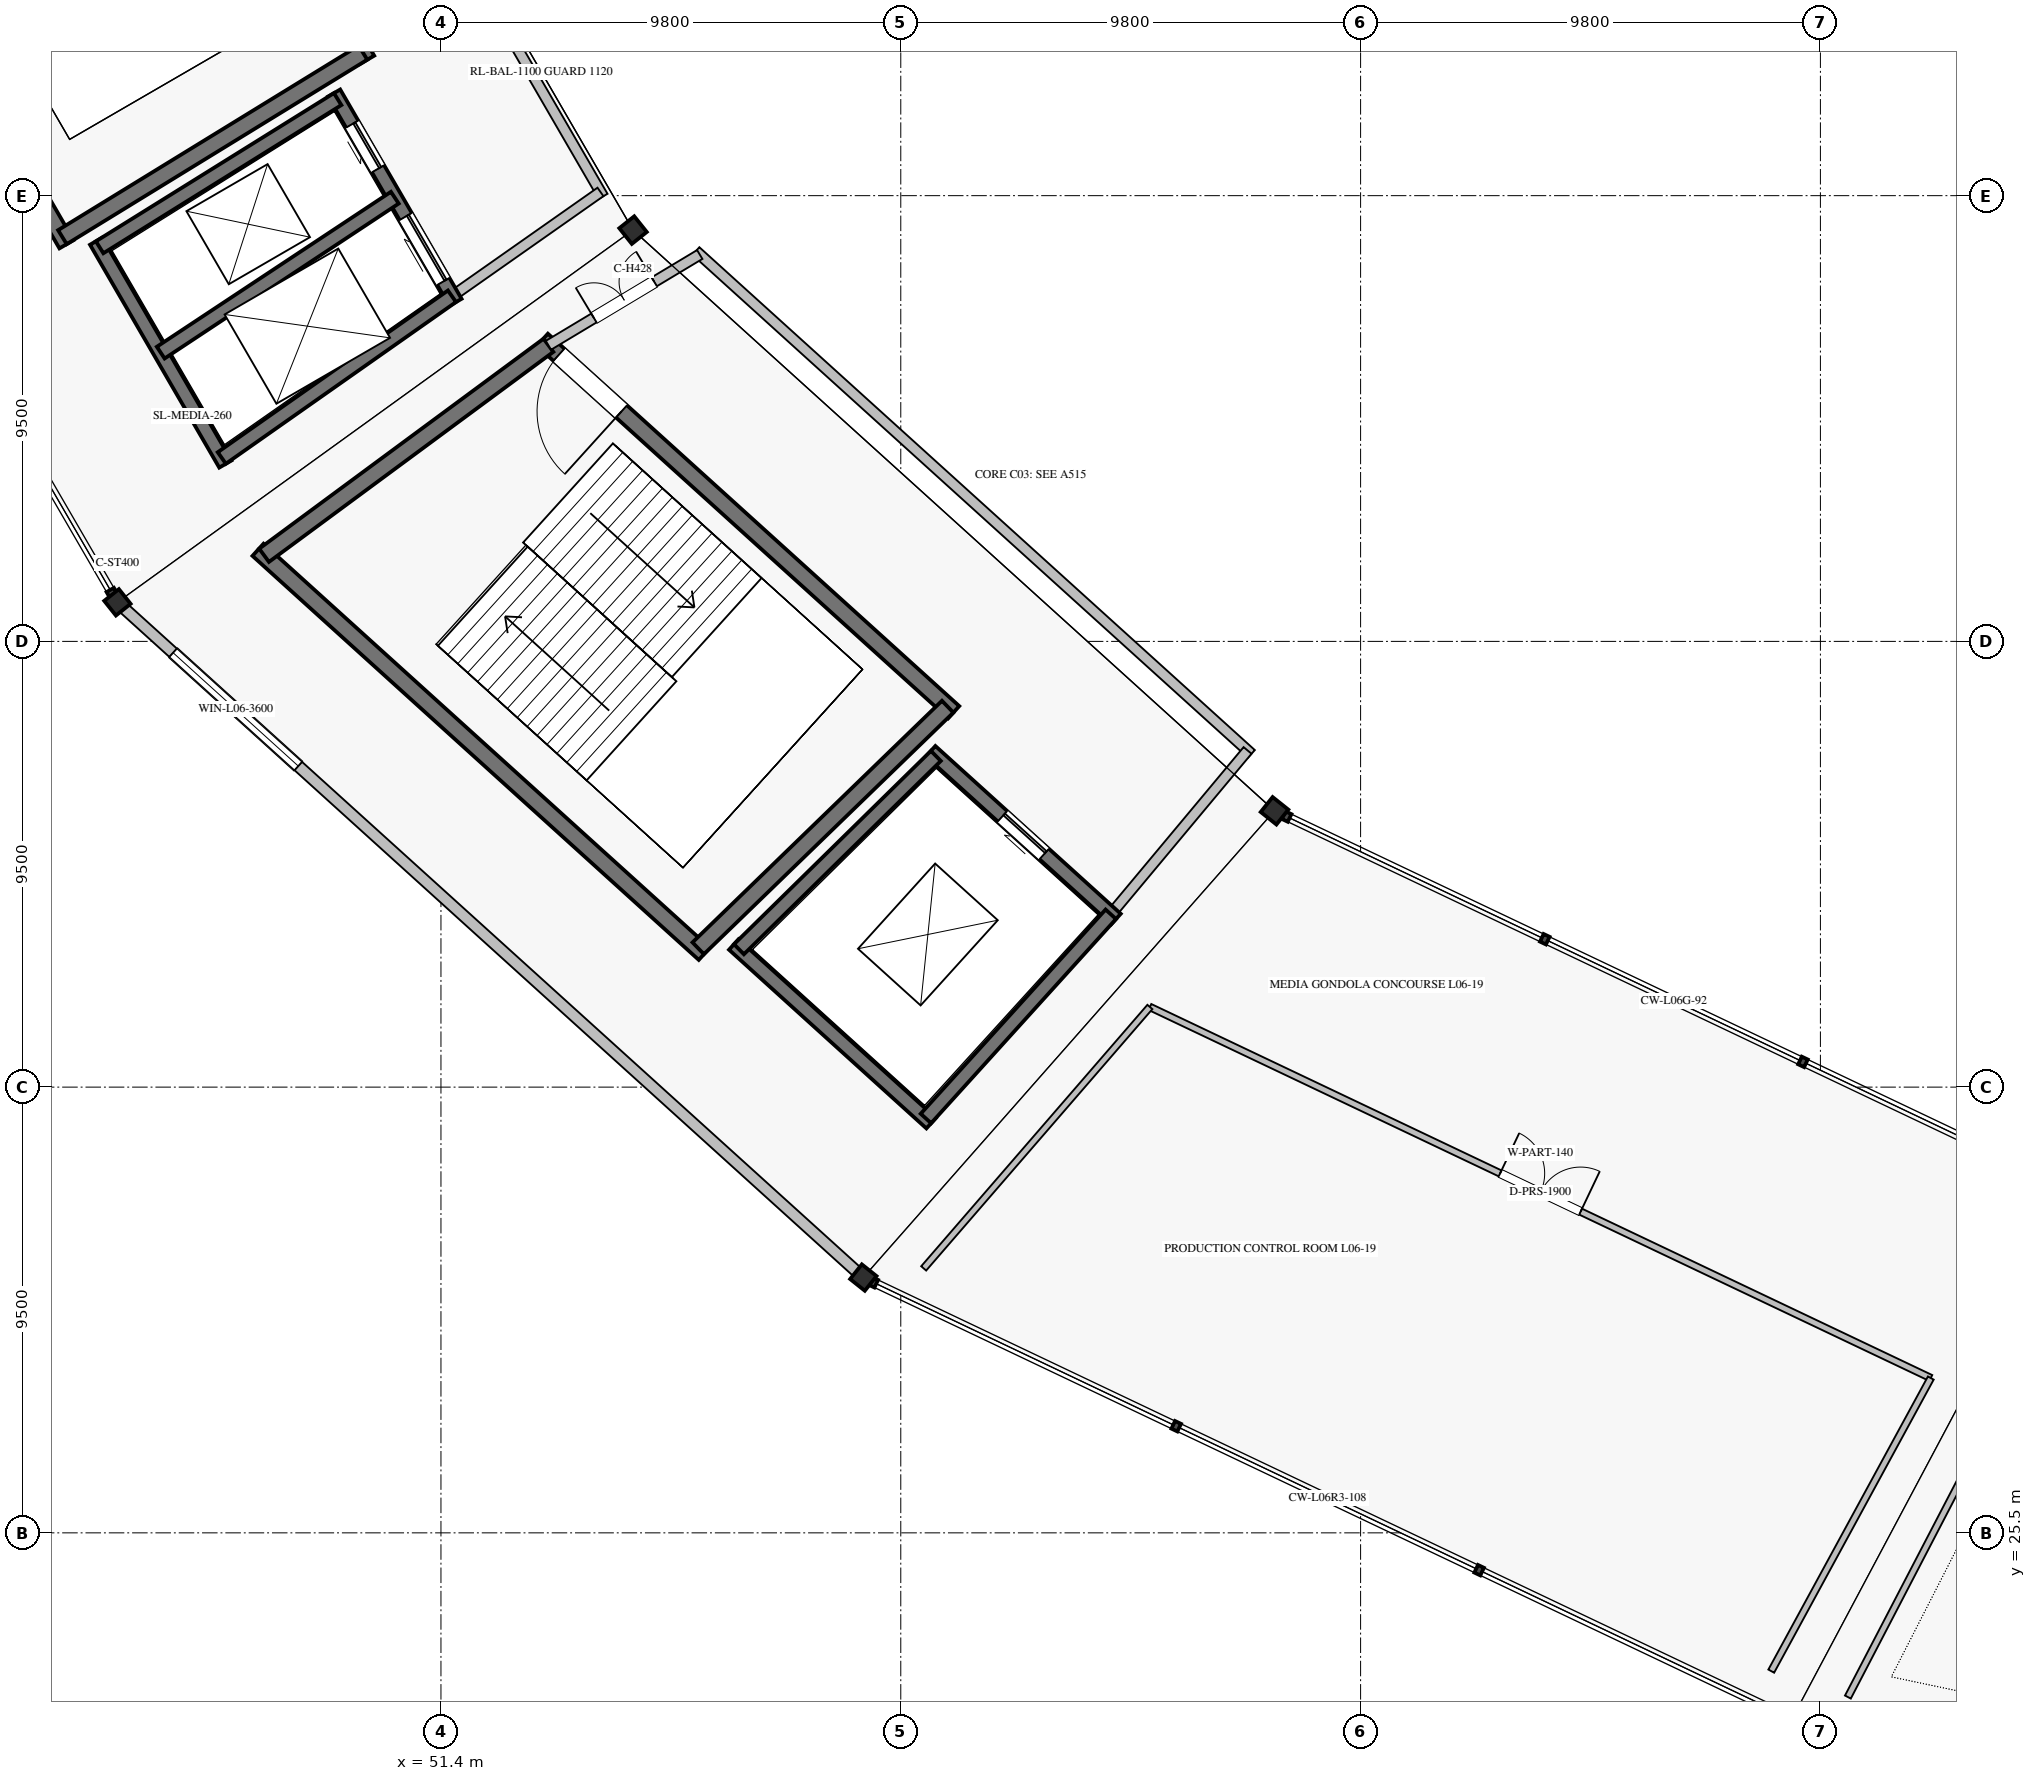
"""IFC4 building model, lengths in metres.
Left out: names, types, materials, properties, quantities, classifications, styles, units other than length and angle.
Written with IfcOpenShell. Run it as: python <this file> out.ifc"""

import sys

from ifc_helpers import new_model, si_unit, direction, frame, frame_2d, origin, origin_2d, place, context, subcontext, project, spatial, rectangle, hollow_rectangle, i_section, extrude, element, fill, save


model = new_model("IFC4")
c1 = context("Model", 3, precision=1e-05, world=origin(), true_north=direction((0.0, 1.0)))
c2 = subcontext(c1, "Body", "Model", "MODEL_VIEW")
j1 = project(units=[si_unit("LENGTHUNIT", "METRE"), si_unit("PLANEANGLEUNIT", "RADIAN")], contexts=[c1])
p1 = place(None, origin())
s1 = spatial("IfcSite", under=j1, at=p1, CompositionType="ELEMENT")
p2 = place(p1, origin())
s2 = spatial("IfcBuilding", under=s1, at=p2, CompositionType="ELEMENT")
p3 = place(p2, frame((0.0, 0.0, 31.28)))
s3 = spatial("IfcBuildingStorey", under=s2, at=p3, CompositionType="ELEMENT", Elevation=31.28)
for number, where, z_axis, x_axis in (
    (1, (55.494, 53.266, 0.0), (0.0, 0.0, 1.0), (-0.782, -0.623, 0.0)),
    (2, (69.166, 40.889, 0.0), (0.0, 0.0, 1.0), (-0.623, -0.782, 0.0)),
):
    element("IfcColumn", number, at=place(p3, frame(where, z_axis=z_axis, x_axis=x_axis)), inside=s3, PredefinedType="COLUMN", context=c2, shape_type="SweptSolid", body=[
        extrude(i_section(OverallWidth=0.407, OverallDepth=0.428, WebThickness=0.02, FlangeThickness=0.035, FilletRadius=0.013, at=origin_2d()), origin(), (0.0, 0.0, 1.0), 5.44),
    ])
for number, where, z_axis, x_axis in (
    (3, (44.505, 45.332, 0.0), (0.0, 0.0, 1.0), (-0.782, -0.623, 0.0)),
    (4, (60.402, 30.941, 0.0), (0.0, 0.0, 1.0), (-0.623, -0.782, 0.0)),
):
    element("IfcColumn", number, at=place(p3, frame(where, z_axis=z_axis, x_axis=x_axis)), inside=s3, PredefinedType="COLUMN", context=c2, shape_type="SweptSolid", body=[
        extrude(hollow_rectangle(XDim=0.4, YDim=0.4, WallThickness=0.019, at=origin_2d()), origin(), (0.0, 0.0, 1.0), 5.44),
    ])
p4 = place(p3, frame((44.653, 45.198, 0.0), z_axis=(0.0, 0.0, 1.0), x_axis=(0.74134637924, -0.671122601309, 0.0)))
e5 = element("IfcWall", 5, at=p4, inside=s3, PredefinedType="SOLIDWALL", context=c2, shape_type="SweptSolid", body=[
    extrude(rectangle(XDim=21.044, YDim=0.24, at=frame_2d((10.522, 0.0))), origin(), (0.0, 0.0, 1.0), 4.358),
])
p5 = place(p4, frame((1.4, 0.0, 1.0)))
e6 = element("IfcOpeningElement", 6, at=p5, cuts=e5, PredefinedType="OPENING", context=c2, shape_type="SweptSolid", body=[
    extrude(rectangle(XDim=3.6, YDim=2.4, at=frame_2d((1.8, 1.2))), frame((0.0, 0.13, 0.0), z_axis=(0.0, -1.0, 0.0), x_axis=(1.0, 0.0, 0.0)), (0.0, 0.0, 1.0), 0.26),
])
p6 = place(p3, frame((44.09, 66.788, 0.0), z_axis=(0.0, 0.0, 1.0), x_axis=(0.501628624814, -0.865083072755, 0.0)))
e7 = element("IfcWall", 7, at=p6, inside=s3, PredefinedType="SHEAR", context=c2, shape_type="SweptSolid", body=[
    extrude(rectangle(XDim=11.435, YDim=0.35, at=frame_2d((5.718, 0.0))), origin(), (0.0, 0.0, 1.0), 5.16),
])
p7 = place(p6, frame((0.475, 0.0, 0.0)))
e8 = element("IfcOpeningElement", 8, at=p7, cuts=e7, PredefinedType="OPENING", context=c2, shape_type="SweptSolid", body=[
    extrude(rectangle(XDim=1.8, YDim=2.2, at=frame_2d((0.9, 1.1))), frame((0.0, 0.185, 0.0), z_axis=(0.0, -1.0, 0.0), x_axis=(1.0, 0.0, 0.0)), (0.0, 0.0, 1.0), 0.37),
])
p8 = place(p3, frame((37.198, 63.695, 0.0), z_axis=(0.0, 0.0, 1.0), x_axis=(0.501601740165, -0.865098661577, 0.0)))
e9 = element("IfcWall", 9, at=p8, inside=s3, PredefinedType="SHEAR", context=c2, shape_type="SweptSolid", body=[
    extrude(rectangle(XDim=12.405, YDim=0.35, at=frame_2d((6.202, 0.0))), origin(), (0.0, 0.0, 1.0), 5.16),
])
p9 = place(p3, frame((49.739, 57.046, 0.0), z_axis=(0.0, 0.0, 1.0), x_axis=(-0.852334575619, -0.522996913188, 0.0)))
e10 = element("IfcWall", 10, at=p9, inside=s3, PredefinedType="SHEAR", context=c2, shape_type="SweptSolid", body=[
    extrude(rectangle(XDim=7.516, YDim=0.35, at=frame_2d((3.758, 0.0))), origin(), (0.0, 0.0, 1.0), 5.16),
])
p10 = place(p3, frame((49.123, 56.188, 0.0), z_axis=(0.0, 0.0, 1.0), x_axis=(0.501629534056, -0.86508254552, 0.0)))
e11 = element("IfcWall", 11, at=p10, inside=s3, PredefinedType="SHEAR", context=c2, shape_type="SweptSolid", body=[
    extrude(rectangle(XDim=5.157, YDim=0.3, at=frame_2d((2.579, 0.0))), origin(), (0.0, 0.0, 1.0), 5.16),
])
p11 = place(p10, frame((0.766, 0.0, 0.0)))
e12 = element("IfcOpeningElement", 12, at=p11, cuts=e11, PredefinedType="OPENING", context=c2, shape_type="SweptSolid", body=[
    extrude(rectangle(XDim=1.1, YDim=2.2, at=frame_2d((0.55, 1.1))), frame((0.0, 0.16, 0.0), z_axis=(0.0, -1.0, 0.0), x_axis=(1.0, 0.0, 0.0)), (0.0, 0.0, 1.0), 0.32),
])
p12 = place(p10, frame((3.042, 0.0, 0.0)))
e13 = element("IfcOpeningElement", 13, at=p12, cuts=e11, PredefinedType="OPENING", context=c2, shape_type="SweptSolid", body=[
    extrude(rectangle(XDim=1.6, YDim=2.3, at=frame_2d((0.8, 1.15))), frame((0.0, 0.16, 0.0), z_axis=(0.0, -1.0, 0.0), x_axis=(1.0, 0.0, 0.0)), (0.0, 0.0, 1.0), 0.32),
])
p13 = place(p3, frame((44.05, 53.03, 0.0), z_axis=(0.0, 0.0, 1.0), x_axis=(0.501596987756, -0.865101417103, 0.0)))
e14 = element("IfcWall", 14, at=p13, inside=s3, PredefinedType="SHEAR", context=c2, shape_type="SweptSolid", body=[
    extrude(rectangle(XDim=5.491, YDim=0.3, at=frame_2d((2.746, 0.0))), origin(), (0.0, 0.0, 1.0), 5.16),
])
p14 = place(p3, frame((49.198, 56.058, 0.0), z_axis=(0.0, 0.0, 1.0), x_axis=(-0.848938067893, -0.528492343257, 0.0)))
e15 = element("IfcWall", 15, at=p14, inside=s3, PredefinedType="SHEAR", context=c2, shape_type="SweptSolid", body=[
    extrude(rectangle(XDim=5.975, YDim=0.3, at=frame_2d((2.988, 0.0))), origin(), (0.0, 0.0, 1.0), 5.16),
])
p15 = place(p3, frame((51.635, 51.855, 0.0), z_axis=(0.0, 0.0, 1.0), x_axis=(-0.818205158105, -0.574926359851, 0.0)))
e16 = element("IfcWall", 16, at=p15, inside=s3, PredefinedType="SHEAR", context=c2, shape_type="SweptSolid", body=[
    extrude(rectangle(XDim=5.995, YDim=0.3, at=frame_2d((2.998, 0.0))), origin(), (0.0, 0.0, 1.0), 5.16),
])
p16 = place(p3, frame((50.417, 53.957, 0.0), z_axis=(0.0, 0.0, 1.0), x_axis=(-0.833878900042, -0.551947443209, 0.0)))
e17 = element("IfcWall", 17, at=p16, inside=s3, PredefinedType="SHEAR", context=c2, shape_type="SweptSolid", body=[
    extrude(rectangle(XDim=5.983, YDim=0.3, at=frame_2d((2.991, 0.0))), origin(), (0.0, 0.0, 1.0), 5.16),
])
p17 = place(p3, frame((46.774, 67.921, 0.0), z_axis=(0.0, 0.0, 1.0), x_axis=(0.501612626242, -0.865092349518, 0.0)))
e18 = element("IfcWall", 18, at=p17, inside=s3, PredefinedType="SOLIDWALL", context=c2, shape_type="SweptSolid", body=[
    extrude(rectangle(XDim=16.11, YDim=0.22, at=frame_2d((8.055, 0.0))), origin(), (0.0, 0.0, 1.0), 5.16),
])
p18 = place(p3, frame((54.8, 54.079, 0.0), z_axis=(0.0, 0.0, 1.0), x_axis=(-0.818225400643, -0.574897550649, 0.0)))
e19 = element("IfcWall", 19, at=p18, inside=s3, PredefinedType="SOLIDWALL", context=c2, shape_type="SweptSolid", body=[
    extrude(rectangle(XDim=3.868, YDim=0.22, at=frame_2d((1.934, 0.0))), origin(), (0.0, 0.0, 1.0), 5.16),
])
p19 = place(p3, frame((53.561, 50.928, 0.0), z_axis=(0.0, 0.0, 1.0), x_axis=(0.741358227035, -0.671109513572, 0.0)))
e20 = element("IfcWall", 20, at=p19, inside=s3, PredefinedType="SHEAR", context=c2, shape_type="SweptSolid", body=[
    extrude(rectangle(XDim=11.827, YDim=0.35, at=frame_2d((5.913, 0.0))), origin(), (0.0, 0.0, 1.0), 5.16),
])
p20 = place(p19, frame((0.475, 0.0, 0.0)))
e21 = element("IfcOpeningElement", 21, at=p20, cuts=e20, PredefinedType="OPENING", context=c2, shape_type="SweptSolid", body=[
    extrude(rectangle(XDim=1.8, YDim=2.2, at=frame_2d((0.9, 1.1))), frame((0.0, 0.185, 0.0), z_axis=(0.0, -1.0, 0.0), x_axis=(1.0, 0.0, 0.0)), (0.0, 0.0, 1.0), 0.37),
])
p21 = place(p3, frame((47.501, 46.452, 0.0), z_axis=(0.0, 0.0, 1.0), x_axis=(0.741351373721, -0.671117084183, 0.0)))
e22 = element("IfcWall", 22, at=p21, inside=s3, PredefinedType="SHEAR", context=c2, shape_type="SweptSolid", body=[
    extrude(rectangle(XDim=12.83, YDim=0.35, at=frame_2d((6.415, 0.0))), origin(), (0.0, 0.0, 1.0), 5.16),
])
p22 = place(p3, frame((53.691, 50.811, 0.0), z_axis=(0.0, 0.0, 1.0), x_axis=(-0.804395625347, -0.594093997548, 0.0)))
e23 = element("IfcWall", 23, at=p22, inside=s3, PredefinedType="SHEAR", context=c2, shape_type="SweptSolid", body=[
    extrude(rectangle(XDim=7.534, YDim=0.35, at=frame_2d((3.767, 0.0))), origin(), (0.0, 0.0, 1.0), 5.16),
])
p23 = place(p3, frame((62.199, 43.108, 0.0), z_axis=(0.0, 0.0, 1.0), x_axis=(-0.718297398554, -0.69573619083, 0.0)))
e24 = element("IfcWall", 24, at=p23, inside=s3, PredefinedType="SHEAR", context=c2, shape_type="SweptSolid", body=[
    extrude(rectangle(XDim=7.402, YDim=0.35, at=frame_2d((3.701, 0.0))), origin(), (0.0, 0.0, 1.0), 5.16),
])
p24 = place(p3, frame((61.837, 42.159, 0.0), z_axis=(0.0, 0.0, 1.0), x_axis=(0.741350155641, -0.671118429736, 0.0)))
e25 = element("IfcWall", 25, at=p24, inside=s3, PredefinedType="SHEAR", context=c2, shape_type="SweptSolid", body=[
    extrude(rectangle(XDim=5.329, YDim=0.3, at=frame_2d((2.665, 0.0))), origin(), (0.0, 0.0, 1.0), 5.16),
])
p25 = place(p24, frame((2.065, 0.0, 0.0)))
e26 = element("IfcOpeningElement", 26, at=p25, cuts=e25, PredefinedType="OPENING", context=c2, shape_type="SweptSolid", body=[
    extrude(rectangle(XDim=1.2, YDim=2.2, at=frame_2d((0.6, 1.1))), frame((0.0, 0.16, 0.0), z_axis=(0.0, -1.0, 0.0), x_axis=(1.0, 0.0, 0.0)), (0.0, 0.0, 1.0), 0.32),
])
p26 = place(p3, frame((57.64, 38.039, 0.0), z_axis=(0.0, 0.0, 1.0), x_axis=(0.74134208775, -0.671127341815, 0.0)))
e27 = element("IfcWall", 27, at=p26, inside=s3, PredefinedType="SHEAR", context=c2, shape_type="SweptSolid", body=[
    extrude(rectangle(XDim=5.675, YDim=0.3, at=frame_2d((2.837, 0.0))), origin(), (0.0, 0.0, 1.0), 5.16),
])
p27 = place(p3, frame((61.948, 42.059, 0.0), z_axis=(0.0, 0.0, 1.0), x_axis=(-0.713553028001, -0.700601224828, 0.0)))
e28 = element("IfcWall", 28, at=p27, inside=s3, PredefinedType="SHEAR", context=c2, shape_type="SweptSolid", body=[
    extrude(rectangle(XDim=5.881, YDim=0.3, at=frame_2d((2.94, 0.0))), origin(), (0.0, 0.0, 1.0), 5.16),
])
p28 = place(p3, frame((65.676, 38.684, 0.0), z_axis=(0.0, 0.0, 1.0), x_axis=(-0.67115829282, -0.741314067031, 0.0)))
e29 = element("IfcWall", 29, at=p28, inside=s3, PredefinedType="SHEAR", context=c2, shape_type="SweptSolid", body=[
    extrude(rectangle(XDim=5.871, YDim=0.3, at=frame_2d((2.935, 0.0))), origin(), (0.0, 0.0, 1.0), 5.16),
])
p29 = place(p3, frame((56.834, 52.819, 0.0), z_axis=(0.0, 0.0, 1.0), x_axis=(0.741351035574, -0.671117457717, 0.0)))
e30 = element("IfcWall", 30, at=p29, inside=s3, PredefinedType="SOLIDWALL", context=c2, shape_type="SweptSolid", body=[
    extrude(rectangle(XDim=15.969, YDim=0.22, at=frame_2d((7.985, 0.0))), origin(), (0.0, 0.0, 1.0), 5.16),
])
p30 = place(p3, frame((56.915, 52.746, 0.0), z_axis=(0.0, 0.0, 1.0), x_axis=(-0.857424171966, -0.514610327654, 0.0)))
e31 = element("IfcWall", 31, at=p30, inside=s3, PredefinedType="SOLIDWALL", context=c2, shape_type="SweptSolid", body=[
    extrude(rectangle(XDim=3.76, YDim=0.22, at=frame_2d((1.88, 0.0))), origin(), (0.0, 0.0, 1.0), 5.16),
])
p31 = place(p30, frame((1.13, 0.0, 0.0)))
e32 = element("IfcOpeningElement", 32, at=p31, cuts=e31, PredefinedType="OPENING", context=c2, shape_type="SweptSolid", body=[
    extrude(rectangle(XDim=1.5, YDim=2.2, at=frame_2d((0.75, 1.1))), frame((0.0, 0.12, 0.0), z_axis=(0.0, -1.0, 0.0), x_axis=(1.0, 0.0, 0.0)), (0.0, 0.0, 1.0), 0.24),
])
p32 = place(p3, frame((68.591, 42.176, 0.0), z_axis=(0.0, 0.0, 1.0), x_axis=(-0.640759627034, -0.767741558315, 0.0)))
e33 = element("IfcWall", 33, at=p32, inside=s3, PredefinedType="SOLIDWALL", context=c2, shape_type="SweptSolid", body=[
    extrude(rectangle(XDim=4.549, YDim=0.22, at=frame_2d((2.274, 0.0))), origin(), (0.0, 0.0, 1.0), 5.16),
])
p33 = place(p3, frame((66.509, 36.708, 0.0), z_axis=(0.0, 0.0, 1.0), x_axis=(0.90321677741, -0.429184637429, 0.0)))
e34 = element("IfcWall", 34, at=p33, inside=s3, PredefinedType="PARTITIONING", context=c2, shape_type="SweptSolid", body=[
    extrude(rectangle(XDim=18.427, YDim=0.14, at=frame_2d((9.214, 0.0))), origin(), (0.0, 0.0, 1.0), 4.48),
])
p34 = place(p33, frame((8.264, 0.0, 0.0)))
e35 = element("IfcOpeningElement", 35, at=p34, cuts=e34, PredefinedType="OPENING", context=c2, shape_type="SweptSolid", body=[
    extrude(rectangle(XDim=1.9, YDim=2.35, at=frame_2d((0.95, 1.175))), frame((0.0, 0.08, 0.0), z_axis=(0.0, -1.0, 0.0), x_axis=(1.0, 0.0, 0.0)), (0.0, 0.0, 1.0), 0.16),
])
p35 = place(p3, frame((66.509, 36.708, 0.0), z_axis=(0.0, 0.0, 1.0), x_axis=(-0.654288201841, -0.7562452968, 0.0)))
e36 = element("IfcWall", 36, at=p35, inside=s3, PredefinedType="PARTITIONING", context=c2, shape_type="SweptSolid", body=[
    extrude(rectangle(XDim=7.368, YDim=0.14, at=frame_2d((3.684, 0.0))), origin(), (0.0, 0.0, 1.0), 4.48),
])
p36 = place(p3, frame((83.153, 28.8, 0.0), z_axis=(0.0, 0.0, 1.0), x_axis=(-0.47812325427, -0.878292749444, 0.0)))
e37 = element("IfcWall", 37, at=p36, inside=s3, PredefinedType="PARTITIONING", context=c2, shape_type="SweptSolid", body=[
    extrude(rectangle(XDim=7.113, YDim=0.14, at=frame_2d((3.556, 0.0))), origin(), (0.0, 0.0, 1.0), 4.48),
])
p37 = place(p3, frame((84.658, 28.29, 0.0), z_axis=(0.0, 0.0, 1.0), x_axis=(-0.461466568794, -0.887157599238, 0.0)))
e38 = element("IfcWall", 38, at=p37, inside=s3, PredefinedType="PARTITIONING", context=c2, shape_type="SweptSolid", body=[
    extrude(rectangle(XDim=7.09, YDim=0.14, at=frame_2d((3.545, 0.0))), origin(), (0.0, 0.0, 1.0), 4.48),
])
p38 = place(p5, origin())
e39 = element("IfcWindow", 39, at=p38, inside=s3, PartitioningType="SINGLE_PANEL", PredefinedType="WINDOW", context=c2, shape_type="SweptSolid", body=[
    extrude(rectangle(XDim=3.6, YDim=2.4, at=frame_2d((1.8, 1.2))), frame((0.0, 0.03, 0.0), z_axis=(0.0, -1.0, 0.0), x_axis=(1.0, 0.0, 0.0)), (0.0, 0.0, 1.0), 0.06),
])
fill(e6, e39)
p39 = place(p11, origin())
e40 = element("IfcDoor", 40, at=p39, inside=s3, OperationType="SLIDING_TO_RIGHT", PredefinedType="DOOR", context=c2, shape_type="SweptSolid", body=[
    extrude(rectangle(XDim=1.1, YDim=2.2, at=frame_2d((0.55, 1.1))), frame((0.0, 0.025, 0.0), z_axis=(0.0, -1.0, 0.0), x_axis=(1.0, 0.0, 0.0)), (0.0, 0.0, 1.0), 0.05),
])
fill(e12, e40)
p40 = place(p12, origin())
e41 = element("IfcDoor", 41, at=p40, inside=s3, OperationType="SLIDING_TO_LEFT", PredefinedType="DOOR", context=c2, shape_type="SweptSolid", body=[
    extrude(rectangle(XDim=1.6, YDim=2.3, at=frame_2d((0.8, 1.15))), frame((0.0, 0.025, 0.0), z_axis=(0.0, -1.0, 0.0), x_axis=(1.0, 0.0, 0.0)), (0.0, 0.0, 1.0), 0.05),
])
fill(e13, e41)
p41 = place(p20, frame((1.8, 0.0, 0.0), z_axis=(0.0, 0.0, 1.0), x_axis=(-1.0, 0.0, 0.0)))
e42 = element("IfcDoor", 42, at=p41, inside=s3, OperationType="SINGLE_SWING_LEFT", PredefinedType="DOOR", context=c2, shape_type="SweptSolid", body=[
    extrude(rectangle(XDim=1.8, YDim=2.2, at=frame_2d((0.9, 1.1))), frame((0.0, 0.025, 0.0), z_axis=(0.0, -1.0, 0.0), x_axis=(1.0, 0.0, 0.0)), (0.0, 0.0, 1.0), 0.05),
])
fill(e21, e42)
p42 = place(p25, origin())
e43 = element("IfcDoor", 43, at=p42, inside=s3, OperationType="SLIDING_TO_LEFT", PredefinedType="DOOR", context=c2, shape_type="SweptSolid", body=[
    extrude(rectangle(XDim=1.2, YDim=2.2, at=frame_2d((0.6, 1.1))), frame((0.0, 0.025, 0.0), z_axis=(0.0, -1.0, 0.0), x_axis=(1.0, 0.0, 0.0)), (0.0, 0.0, 1.0), 0.05),
])
fill(e26, e43)
p43 = place(p31, frame((1.5, 0.0, 0.0), z_axis=(0.0, 0.0, 1.0), x_axis=(-1.0, 0.0, 0.0)))
e44 = element("IfcDoor", 44, at=p43, inside=s3, OperationType="DOUBLE_DOOR_SINGLE_SWING", PredefinedType="DOOR", context=c2, shape_type="SweptSolid", body=[
    extrude(rectangle(XDim=1.5, YDim=2.2, at=frame_2d((0.75, 1.1))), frame((0.0, 0.025, 0.0), z_axis=(0.0, -1.0, 0.0), x_axis=(1.0, 0.0, 0.0)), (0.0, 0.0, 1.0), 0.05),
])
fill(e32, e44)
p44 = place(p34, origin())
e45 = element("IfcDoor", 45, at=p44, inside=s3, OperationType="DOUBLE_DOOR_SINGLE_SWING", PredefinedType="DOOR", context=c2, shape_type="SweptSolid", body=[
    extrude(rectangle(XDim=1.9, YDim=2.35, at=frame_2d((0.95, 1.175))), frame((0.0, 0.025, 0.0), z_axis=(0.0, -1.0, 0.0), x_axis=(1.0, 0.0, 0.0)), (0.0, 0.0, 1.0), 0.05),
])
fill(e35, e45)
save(model, sys.argv[1])
